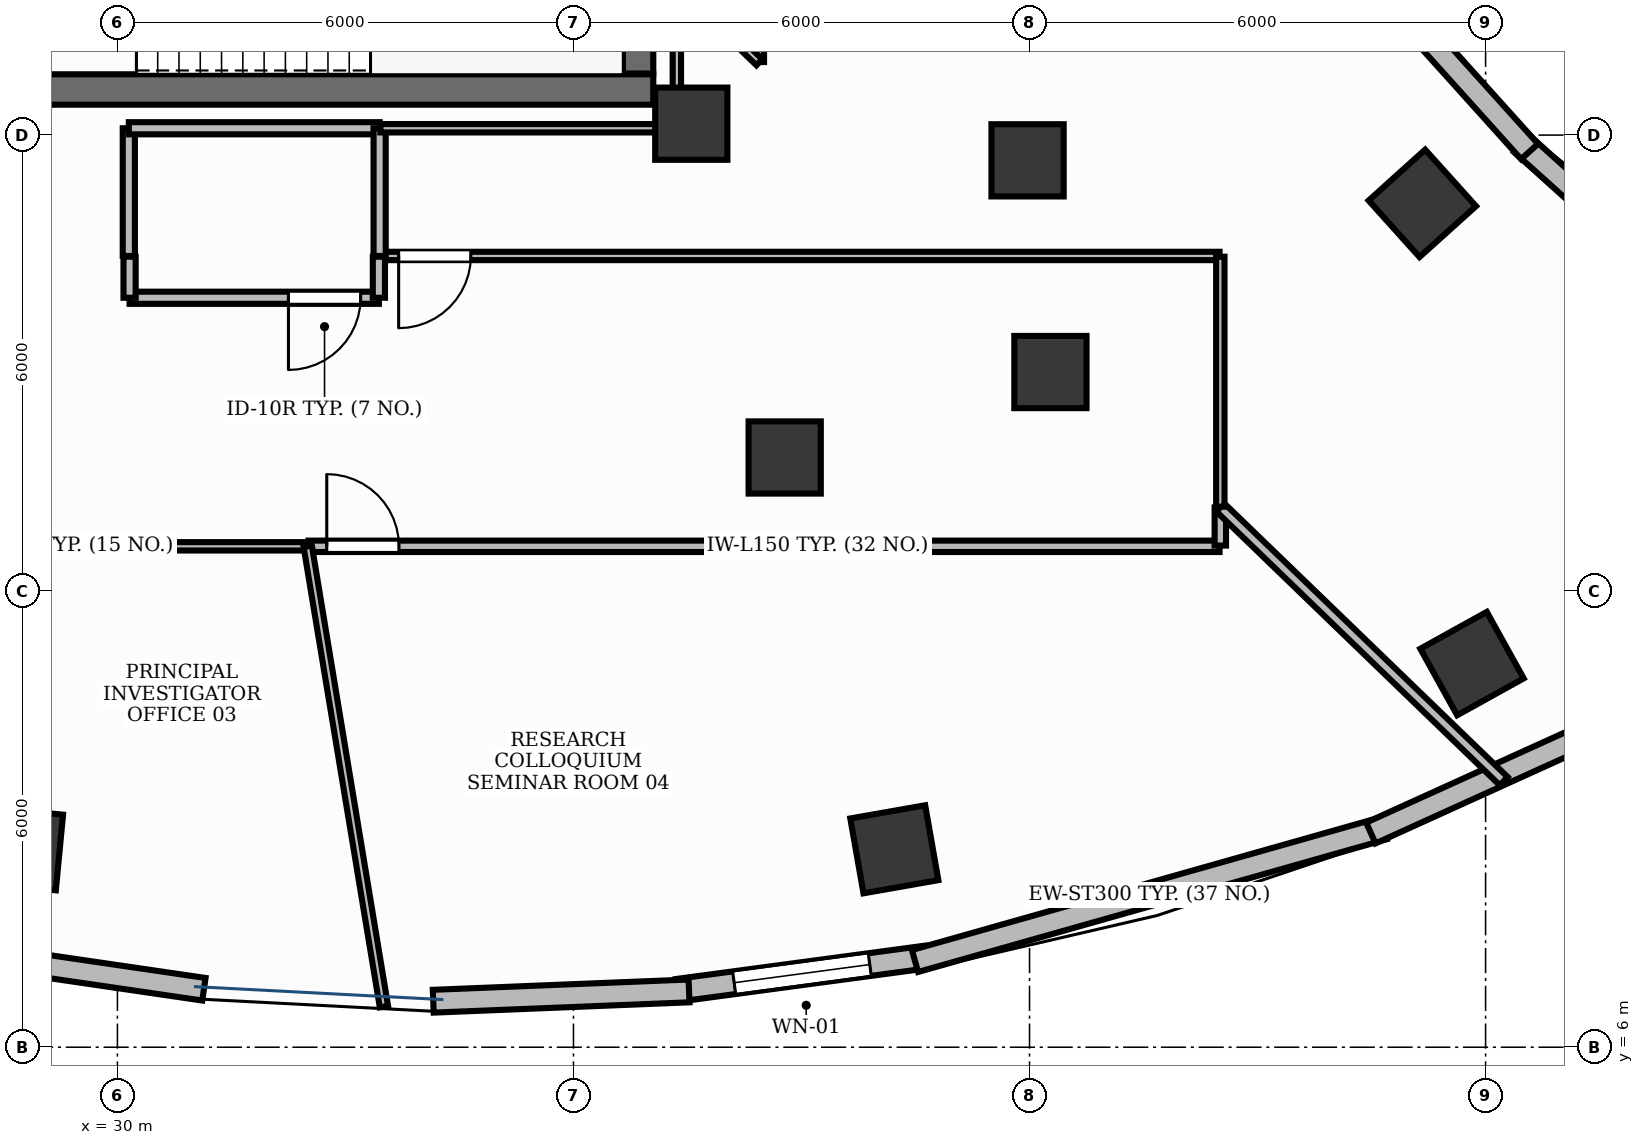
"""IFC4 building model, lengths in metres.
Left out: names, types, materials, properties, quantities, classifications, styles, units other than length and angle.
Written with IfcOpenShell. Run it as: python <this file> out.ifc"""

import sys

from ifc_helpers import new_model, si_unit, direction, frame, frame_2d, origin, origin_2d, place, context, subcontext, project, spatial, rectangle, extrude, element, fill, save


model = new_model("IFC4")
c1 = context("Model", 3, precision=1e-05, world=origin(), true_north=direction((0.0, 1.0)))
c2 = subcontext(c1, "Body", "Model", "MODEL_VIEW")
j1 = project(units=[si_unit("LENGTHUNIT", "METRE"), si_unit("PLANEANGLEUNIT", "RADIAN")], contexts=[c1])
p1 = place(None, origin())
s1 = spatial("IfcSite", under=j1, at=p1, CompositionType="ELEMENT")
p2 = place(p1, origin())
s2 = spatial("IfcBuilding", under=s1, at=p2, CompositionType="ELEMENT")
p3 = place(p2, frame((0.0, 0.0, 187.8)))
s3 = spatial("IfcBuildingStorey", under=s2, at=p3, CompositionType="ELEMENT", Elevation=187.8)
p4 = place(p3, frame((28.852, 18.6, 0.0), z_axis=(0.0, 0.0, 1.0), x_axis=(1.0, 0.0, 0.0)))
e1 = element("IfcWall", 1, at=p4, inside=s3, PredefinedType="SHEAR", context=c2, shape_type="SweptSolid", body=[
    extrude(rectangle(XDim=8.198, YDim=0.4, at=frame_2d((4.099, 0.0))), origin(), (0.0, 0.0, 1.0), 3.9),
])
p5 = place(p3, frame((36.85, 18.81, 0.0), z_axis=(0.0, 0.0, 1.0), x_axis=(0.0, 1.0, 0.0)))
e2 = element("IfcWall", 2, at=p5, inside=s3, PredefinedType="SHEAR", context=c2, shape_type="SweptSolid", body=[
    extrude(rectangle(XDim=3.08, YDim=0.4, at=frame_2d((1.54, 0.0))), origin(), (0.0, 0.0, 1.0), 3.9),
])
p6 = place(p3, frame((37.55, 18.15, -0.0), z_axis=(0.0, 0.0, 1.0), x_axis=(1.0, 0.0, 0.0)))
e3 = element("IfcColumn", 3, at=p6, inside=s3, PredefinedType="PILASTER", context=c2, shape_type="SweptSolid", body=[
    extrude(rectangle(XDim=0.95, YDim=0.95, at=origin_2d()), origin(), (0.0, 0.0, 1.0), 3.901),
])
for number, where, z_axis, x_axis in (
    (4, (28.74, 8.61, -0.0), (0.0, 0.0, 1.0), (-0.995, 0.095, 0.0)),
    (5, (40.221, 8.604, -0.0), (0.0, 0.0, 1.0), (0.985, 0.173, 0.0)),
):
    element("IfcColumn", number, at=place(p3, frame(where, z_axis=z_axis, x_axis=x_axis)), inside=s3, PredefinedType="COLUMN", context=c2, shape_type="SweptSolid", body=[
        extrude(rectangle(XDim=1.0, YDim=1.0, at=origin_2d()), origin(), (0.0, 0.0, 1.0), 3.901),
    ])
p7 = place(p3, frame((38.779, 13.759, -0.0), z_axis=(0.0, 0.0, 1.0), x_axis=(1.0, 0.0, 0.0)))
e6 = element("IfcColumn", 6, at=p7, inside=s3, PredefinedType="COLUMN", context=c2, shape_type="SweptSolid", body=[
    extrude(rectangle(XDim=0.95, YDim=0.95, at=origin_2d()), origin(), (0.0, 0.0, 1.0), 3.901),
])
p8 = place(p3, frame((47.821, 11.047, -0.0), z_axis=(0.0, 0.0, 1.0), x_axis=(0.874535078577, 0.484962262797, 0.0)))
e7 = element("IfcColumn", 7, at=p8, inside=s3, PredefinedType="COLUMN", context=c2, shape_type="SweptSolid", body=[
    extrude(rectangle(XDim=1.0, YDim=1.0, at=origin_2d()), origin(), (0.0, 0.0, 1.0), 3.901),
])
p9 = place(p3, frame((42.275, 14.883, -0.0), z_axis=(0.0, 0.0, 1.0), x_axis=(1.0, 0.0, 0.0)))
e8 = element("IfcColumn", 8, at=p9, inside=s3, PredefinedType="COLUMN", context=c2, shape_type="SweptSolid", body=[
    extrude(rectangle(XDim=0.95, YDim=0.95, at=origin_2d()), origin(), (0.0, 0.0, 1.0), 3.901),
])
p10 = place(p3, frame((47.167, 17.102, -0.0), z_axis=(0.0, 0.0, 1.0), x_axis=(-0.669130606359, 0.743144825477, 0.0)))
e9 = element("IfcColumn", 9, at=p10, inside=s3, PredefinedType="COLUMN", context=c2, shape_type="SweptSolid", body=[
    extrude(rectangle(XDim=1.0, YDim=1.0, at=origin_2d()), origin(), (0.0, 0.0, 1.0), 3.901),
])
p11 = place(p3, frame((41.974, 17.668, -0.0), z_axis=(0.0, 0.0, 1.0), x_axis=(1.0, 0.0, 0.0)))
e10 = element("IfcColumn", 10, at=p11, inside=s3, PredefinedType="COLUMN", context=c2, shape_type="SweptSolid", body=[
    extrude(rectangle(XDim=0.95, YDim=0.95, at=origin_2d()), origin(), (0.0, 0.0, 1.0), 3.901),
])
p12 = place(p3, frame((37.365, 6.748, 0.0), z_axis=(0.0, 0.0, 1.0), x_axis=(0.991139436205, 0.132825517122, 0.0)))
e11 = element("IfcWall", 11, at=p12, inside=s3, PredefinedType="STANDARD", context=c2, shape_type="SweptSolid", body=[
    extrude(rectangle(XDim=3.31, YDim=0.3, at=frame_2d((1.655, 0.0))), origin(), (0.0, 0.0, 1.0), 3.9),
])
p13 = place(p12, frame((0.755, 0.0, 0.9)))
e12 = element("IfcOpeningElement", 12, at=p13, cuts=e11, PredefinedType="OPENING", context=c2, shape_type="SweptSolid", body=[
    extrude(rectangle(XDim=1.8, YDim=2.1, at=frame_2d((0.9, 1.05))), frame((0.0, 0.165, 0.0), z_axis=(0.0, -1.0, 0.0), x_axis=(1.0, 0.0, 0.0)), (0.0, 0.0, 1.0), 0.33),
])
p14 = place(p3, frame((27.826, 7.247, 0.0), z_axis=(0.0, 0.0, 1.0), x_axis=(0.98945927954, -0.144811374319, 0.0)))
e13 = element("IfcWall", 13, at=p14, inside=s3, PredefinedType="STANDARD", context=c2, shape_type="SweptSolid", body=[
    extrude(rectangle(XDim=3.346, YDim=0.3, at=frame_2d((1.673, 0.0))), origin(), (0.0, 0.0, 1.0), 3.47),
])
p15 = place(p3, frame((34.155, 6.605, 0.0), z_axis=(0.0, 0.0, 1.0), x_axis=(0.999190386434, 0.040231475948, 0.0)))
e14 = element("IfcWall", 14, at=p15, inside=s3, PredefinedType="STANDARD", context=c2, shape_type="SweptSolid", body=[
    extrude(rectangle(XDim=3.368, YDim=0.3, at=frame_2d((1.684, 0.0))), origin(), (0.0, 0.0, 1.0), 3.9),
])
p16 = place(p3, frame((40.493, 7.134, 0.0), z_axis=(0.0, 0.0, 1.0), x_axis=(0.962163849422, 0.272471515694, 0.0)))
e15 = element("IfcWall", 15, at=p16, inside=s3, PredefinedType="STANDARD", context=c2, shape_type="SweptSolid", body=[
    extrude(rectangle(XDim=6.409, YDim=0.3, at=frame_2d((3.205, 0.0))), origin(), (0.0, 0.0, 1.0), 3.9),
])
p17 = place(p3, frame((46.49, 8.818, 0.0), z_axis=(0.0, 0.0, 1.0), x_axis=(0.910633193525, 0.413215666268, 0.0)))
e16 = element("IfcWall", 16, at=p17, inside=s3, PredefinedType="STANDARD", context=c2, shape_type="SweptSolid", body=[
    extrude(rectangle(XDim=3.195, YDim=0.3, at=frame_2d((1.598, 0.0))), origin(), (0.0, 0.0, 1.0), 3.9),
])
p18 = place(p3, frame((50.936, 15.673, 0.0), z_axis=(0.0, 0.0, 1.0), x_axis=(-0.743341827472, 0.668911748687, 0.0)))
e17 = element("IfcWall", 17, at=p18, inside=s3, PredefinedType="STANDARD", context=c2, shape_type="SweptSolid", body=[
    extrude(rectangle(XDim=3.31, YDim=0.3, at=frame_2d((1.655, 0.0))), origin(), (0.0, 0.0, 1.0), 3.9),
])
p19 = place(p3, frame((48.579, 17.784, 0.0), z_axis=(0.0, 0.0, 1.0), x_axis=(-0.669165704933, 0.743113221079, 0.0)))
e18 = element("IfcWall", 18, at=p19, inside=s3, PredefinedType="STANDARD", context=c2, shape_type="SweptSolid", body=[
    extrude(rectangle(XDim=3.087, YDim=0.3, at=frame_2d((1.543, 0.0))), origin(), (0.0, 0.0, 1.0), 3.9),
])
p20 = place(p3, frame((33.44, 15.86, 0.0), z_axis=(0.0, 0.0, 1.0), x_axis=(-1.0, 0.0, 0.0)))
e19 = element("IfcWall", 19, at=p20, inside=s3, PredefinedType="PARTITIONING", context=c2, shape_type="SweptSolid", body=[
    extrude(rectangle(XDim=3.28, YDim=0.16, at=frame_2d((1.64, 0.0))), origin(), (0.0, 0.0, 1.0), 2.91),
])
p21 = place(p20, frame((0.24, 0.0, 0.0)))
e20 = element("IfcOpeningElement", 20, at=p21, cuts=e19, PredefinedType="OPENING", context=c2, shape_type="SweptSolid", body=[
    extrude(rectangle(XDim=0.95, YDim=2.15, at=frame_2d((0.475, 1.075))), frame((0.0, 0.095, 0.0), z_axis=(0.0, -1.0, 0.0), x_axis=(1.0, 0.0, 0.0)), (0.0, 0.0, 1.0), 0.19),
])
p22 = place(p3, frame((19.85, 12.59, 0.0), z_axis=(0.0, 0.0, 1.0), x_axis=(1.0, 0.0, 0.0)))
e21 = element("IfcWall", 21, at=p22, inside=s3, PredefinedType="MOVABLE", context=c2, shape_type="SweptSolid", body=[
    extrude(rectangle(XDim=12.654, YDim=0.11, at=frame_2d((6.327, 0.0))), origin(), (0.0, 0.0, 1.0), 2.91),
])
p23 = place(p22, frame((4.994, 0.0, 0.0)))
e22 = element("IfcOpeningElement", 22, at=p23, cuts=e21, PredefinedType="OPENING", context=c2, shape_type="SweptSolid", body=[
    extrude(rectangle(XDim=0.95, YDim=2.15, at=frame_2d((0.475, 1.075))), frame((0.0, 0.07, 0.0), z_axis=(0.0, -1.0, 0.0), x_axis=(1.0, 0.0, 0.0)), (0.0, 0.0, 1.0), 0.14),
])
p24 = place(p3, frame((32.514, 12.59, 0.0), z_axis=(0.0, 0.0, 1.0), x_axis=(1.0, 0.0, 0.0)))
e23 = element("IfcWall", 23, at=p24, inside=s3, PredefinedType="PARTITIONING", context=c2, shape_type="SweptSolid", body=[
    extrude(rectangle(XDim=11.986, YDim=0.15, at=frame_2d((5.993, 0.0))), origin(), (0.0, 0.0, 1.0), 2.91),
])
p25 = place(p24, frame((0.24, 0.0, 0.0)))
e24 = element("IfcOpeningElement", 24, at=p25, cuts=e23, PredefinedType="OPENING", context=c2, shape_type="SweptSolid", body=[
    extrude(rectangle(XDim=0.95, YDim=2.15, at=frame_2d((0.475, 1.075))), frame((0.0, 0.09, 0.0), z_axis=(0.0, -1.0, 0.0), x_axis=(1.0, 0.0, 0.0)), (0.0, 0.0, 1.0), 0.18),
])
p26 = place(p3, frame((44.5, 16.41, 0.0), z_axis=(0.0, 0.0, 1.0), x_axis=(-1.0, 0.0, 0.0)))
e25 = element("IfcWall", 25, at=p26, inside=s3, PredefinedType="MOVABLE", context=c2, shape_type="SweptSolid", body=[
    extrude(rectangle(XDim=11.04, YDim=0.11, at=frame_2d((5.52, 0.0))), origin(), (0.0, 0.0, 1.0), 2.91),
])
p27 = place(p26, frame((9.85, 0.0, 0.0)))
e26 = element("IfcOpeningElement", 26, at=p27, cuts=e25, PredefinedType="OPENING", context=c2, shape_type="SweptSolid", body=[
    extrude(rectangle(XDim=0.95, YDim=2.15, at=frame_2d((0.475, 1.075))), frame((0.0, 0.07, 0.0), z_axis=(0.0, -1.0, 0.0), x_axis=(1.0, 0.0, 0.0)), (0.0, 0.0, 1.0), 0.14),
])
for number, where, z_axis, x_axis in (
    (27, (33.44, 16.4, 0.0), (0.0, 0.0, 1.0), (0.0, -1.0, 0.0)),
    (28, (30.16, 15.86, 0.0), (0.0, 0.0, 1.0), (0.0, 1.0, 0.0)),
):
    element("IfcWall", number, at=place(p3, frame(where, z_axis=z_axis, x_axis=x_axis)), inside=s3, PredefinedType="PARTITIONING", context=c2, shape_type="SweptSolid", body=[
        extrude(rectangle(XDim=0.54, YDim=0.16, at=frame_2d((0.27, 0.0))), origin(), (0.0, 0.0, 1.0), 2.91),
    ])
p28 = place(p3, frame((30.15, 16.41, 0.0), z_axis=(0.0, 0.0, 1.0), x_axis=(0.0, 1.0, 0.0)))
e29 = element("IfcWall", 29, at=p28, inside=s3, PredefinedType="PARTITIONING", context=c2, shape_type="SweptSolid", body=[
    extrude(rectangle(XDim=1.68, YDim=0.16, at=frame_2d((0.84, 0.0))), origin(), (0.0, 0.0, 1.0), 2.91),
])
p29 = place(p3, frame((30.15, 18.09, 0.0), z_axis=(0.0, 0.0, 1.0), x_axis=(1.0, 0.0, 0.0)))
e30 = element("IfcWall", 30, at=p29, inside=s3, PredefinedType="PARTITIONING", context=c2, shape_type="SweptSolid", body=[
    extrude(rectangle(XDim=3.3, YDim=0.16, at=frame_2d((1.65, 0.0))), origin(), (0.0, 0.0, 1.0), 2.91),
])
p30 = place(p3, frame((33.45, 18.09, 0.0), z_axis=(0.0, 0.0, 1.0), x_axis=(0.0, -1.0, 0.0)))
e31 = element("IfcWall", 31, at=p30, inside=s3, PredefinedType="PARTITIONING", context=c2, shape_type="SweptSolid", body=[
    extrude(rectangle(XDim=1.68, YDim=0.16, at=frame_2d((0.84, 0.0))), origin(), (0.0, 0.0, 1.0), 2.91),
])
p31 = place(p3, frame((32.504, 12.59, 0.0), z_axis=(0.0, 0.0, 1.0), x_axis=(0.163321963264, -0.986572823625, 0.0)))
e32 = element("IfcWall", 32, at=p31, inside=s3, PredefinedType="MOVABLE", context=c2, shape_type="SweptSolid", body=[
    extrude(rectangle(XDim=6.139, YDim=0.11, at=frame_2d((3.07, 0.0))), origin(), (0.0, 0.0, 1.0), 2.91),
])
p32 = place(p3, frame((44.51, 12.6, 0.0), z_axis=(0.0, 0.0, 1.0), x_axis=(0.0, 1.0, 0.0)))
e33 = element("IfcWall", 33, at=p32, inside=s3, PredefinedType="PARTITIONING", context=c2, shape_type="SweptSolid", body=[
    extrude(rectangle(XDim=0.501, YDim=0.15, at=frame_2d((0.25, 0.0))), origin(), (0.0, 0.0, 1.0), 2.91),
])
p33 = place(p3, frame((44.51, 13.101, 0.0), z_axis=(0.0, 0.0, 1.0), x_axis=(0.719339776069, -0.694658395591, 0.0)))
e34 = element("IfcWall", 34, at=p33, inside=s3, PredefinedType="PARTITIONING", context=c2, shape_type="SweptSolid", body=[
    extrude(rectangle(XDim=5.183, YDim=0.15, at=frame_2d((2.592, 0.0))), origin(), (0.0, 0.0, 1.0), 2.91),
])
p34 = place(p3, frame((38.452, 18.961, 0.0), z_axis=(0.0, 0.0, 1.0), x_axis=(0.0, 1.0, 0.0)))
e35 = element("IfcWall", 35, at=p34, inside=s3, PredefinedType="MOVABLE", context=c2, shape_type="SweptSolid", body=[
    extrude(rectangle(XDim=1.637, YDim=0.11, at=frame_2d((0.818, 0.0))), origin(), (0.0, 0.0, 1.0), 2.91),
])
p35 = place(p3, frame((44.51, 13.111, 0.0), z_axis=(0.0, 0.0, 1.0), x_axis=(0.0, 1.0, 0.0)))
e36 = element("IfcWall", 36, at=p35, inside=s3, PredefinedType="MOVABLE", context=c2, shape_type="SweptSolid", body=[
    extrude(rectangle(XDim=3.289, YDim=0.11, at=frame_2d((1.644, 0.0))), origin(), (0.0, 0.0, 1.0), 2.91),
])
p36 = place(p3, frame((33.46, 18.09, 0.0), z_axis=(0.0, 0.0, 1.0), x_axis=(1.0, 0.0, 0.0)))
e37 = element("IfcWall", 37, at=p36, inside=s3, PredefinedType="MOVABLE", context=c2, shape_type="SweptSolid", body=[
    extrude(rectangle(XDim=3.89, YDim=0.11, at=frame_2d((1.945, 0.0))), origin(), (0.0, 0.0, 1.0), 2.91),
])
p37 = place(p3, frame((37.36, 18.1, 0.0), z_axis=(0.0, 0.0, 1.0), x_axis=(0.0, 1.0, 0.0)))
e38 = element("IfcWall", 38, at=p37, inside=s3, PredefinedType="MOVABLE", context=c2, shape_type="SweptSolid", body=[
    extrude(rectangle(XDim=1.906, YDim=0.11, at=frame_2d((0.953, 0.0))), origin(), (0.0, 0.0, 1.0), 2.91),
])
p38 = place(p3, frame((37.36, 20.006, 0.0), z_axis=(0.0, 0.0, 1.0), x_axis=(0.719298285006, -0.694701358274, 0.0)))
e39 = element("IfcWall", 39, at=p38, inside=s3, PredefinedType="MOVABLE", context=c2, shape_type="SweptSolid", body=[
    extrude(rectangle(XDim=1.509, YDim=0.11, at=frame_2d((0.754, 0.0))), origin(), (0.0, 0.0, 1.0), 2.91),
])
p39 = place(p13, origin())
e40 = element("IfcWindow", 40, at=p39, inside=s3, PartitioningType="SINGLE_PANEL", PredefinedType="WINDOW", context=c2, shape_type="SweptSolid", body=[
    extrude(rectangle(XDim=1.8, YDim=2.1, at=frame_2d((0.9, 1.05))), frame((0.0, 0.03, 0.0), z_axis=(0.0, -1.0, 0.0), x_axis=(1.0, 0.0, 0.0)), (0.0, 0.0, 1.0), 0.06),
])
fill(e12, e40)
p40 = place(p21, origin())
e41 = element("IfcDoor", 41, at=p40, inside=s3, OperationType="SINGLE_SWING_RIGHT", PredefinedType="DOOR", context=c2, shape_type="SweptSolid", body=[
    extrude(rectangle(XDim=0.95, YDim=2.15, at=frame_2d((0.475, 1.075))), frame((0.0, 0.025, 0.0), z_axis=(0.0, -1.0, 0.0), x_axis=(1.0, 0.0, 0.0)), (0.0, 0.0, 1.0), 0.05),
])
fill(e20, e41)
p41 = place(p25, origin())
e42 = element("IfcDoor", 42, at=p41, inside=s3, OperationType="SINGLE_SWING_LEFT", PredefinedType="DOOR", context=c2, shape_type="SweptSolid", body=[
    extrude(rectangle(XDim=0.95, YDim=2.15, at=frame_2d((0.475, 1.075))), frame((0.0, 0.025, 0.0), z_axis=(0.0, -1.0, 0.0), x_axis=(1.0, 0.0, 0.0)), (0.0, 0.0, 1.0), 0.05),
])
fill(e24, e42)
p42 = place(p27, origin())
e43 = element("IfcDoor", 43, at=p42, inside=s3, OperationType="SINGLE_SWING_RIGHT", PredefinedType="DOOR", context=c2, shape_type="SweptSolid", body=[
    extrude(rectangle(XDim=0.95, YDim=2.15, at=frame_2d((0.475, 1.075))), frame((0.0, 0.025, 0.0), z_axis=(0.0, -1.0, 0.0), x_axis=(1.0, 0.0, 0.0)), (0.0, 0.0, 1.0), 0.05),
])
fill(e26, e43)
save(model, sys.argv[1])
